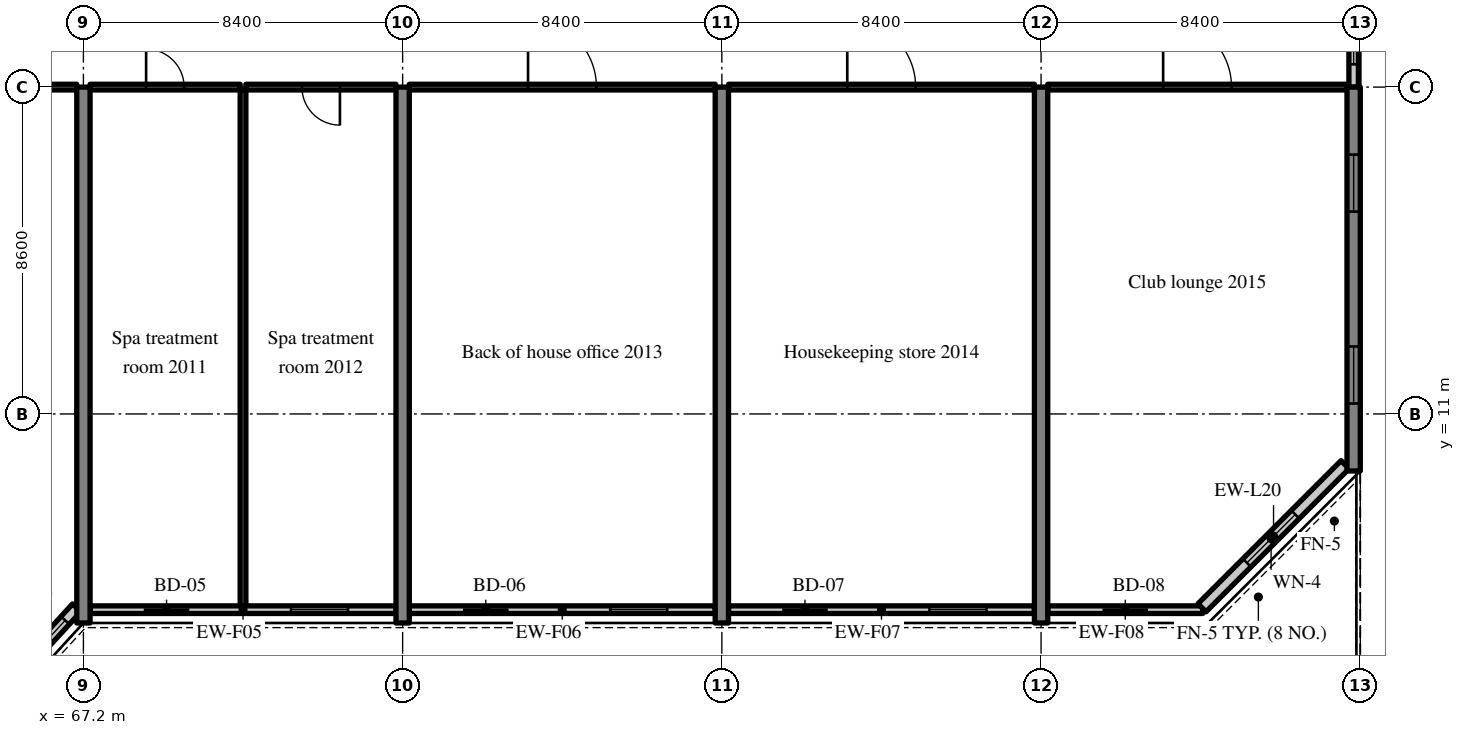
"""IFC4 building model, lengths in metres.
Left out: names, types, materials, properties, quantities, classifications, styles, units other than length and angle.
Written with IfcOpenShell. Run it as: python <this file> out.ifc"""

import sys

from ifc_helpers import new_model, si_unit, direction, frame, frame_2d, origin, place, context, subcontext, project, spatial, rectangle, extrude, source, transform, mapped, element, fill, save


model = new_model("IFC4")
c1 = context("Model", 3, precision=1e-05, world=origin(), true_north=direction((0.0, 1.0)))
c2 = subcontext(c1, "Body", "Model", "MODEL_VIEW")
j1 = project(units=[si_unit("LENGTHUNIT", "METRE"), si_unit("PLANEANGLEUNIT", "RADIAN")], contexts=[c1])
p1 = place(None, origin())
s1 = spatial("IfcSite", under=j1, at=p1, CompositionType="ELEMENT")
p2 = place(p1, origin())
s2 = spatial("IfcBuilding", under=s1, at=p2, CompositionType="ELEMENT")
p3 = place(p2, frame((0.0, 0.0, 86.4)))
s3 = spatial("IfcBuildingStorey", under=s2, at=p3, CompositionType="ELEMENT", Elevation=86.4)
m1 = source(origin(), c2, "Body", "SweptSolid", [
    extrude(rectangle(XDim=14.1, YDim=0.35, at=frame_2d((7.05, 0.0))), origin(), (0.0, 0.0, 1.0), 4.72),
])
for number, where, z_axis, x_axis in (
    (1, (67.2, 5.5, 0.0), (0.0, 0.0, 1.0), (0.0, 1.0, 0.0)),
    (2, (75.6, 5.5, 0.0), (0.0, 0.0, 1.0), (0.0, 1.0, 0.0)),
    (3, (84.0, 5.5, 0.0), (0.0, 0.0, 1.0), (0.0, 1.0, 0.0)),
    (4, (92.4, 5.5, 0.0), (0.0, 0.0, 1.0), (0.0, 1.0, 0.0)),
):
    element("IfcWall", number, at=place(p3, frame(where, z_axis=z_axis, x_axis=x_axis)), inside=s3, PredefinedType="SHEAR", context=c2, shape_type="MappedRepresentation", body=[
        mapped(m1, transform((0.0, 0.0, 0.0), scale=1.0)),
    ])
m2 = source(origin(), c2, "Body", "SweptSolid", [
    extrude(rectangle(XDim=10.1, YDim=0.35, at=frame_2d((5.05, 0.0))), origin(), (0.0, 0.0, 1.0), 4.72),
])
p4 = place(p3, frame((100.625, 9.5, 0.0), z_axis=(0.0, 0.0, 1.0), x_axis=(0.0, 1.0, 0.0)))
e5 = element("IfcWall", 5, at=p4, inside=s3, PredefinedType="SHEAR", context=c2, shape_type="MappedRepresentation", body=[
    mapped(m2, transform((0.0, 0.0, 0.0), scale=1.0)),
])
m3 = source(origin(), c2, "Body", "SweptSolid", [
    extrude(rectangle(XDim=1.5, YDim=1.5, at=frame_2d((0.75, 0.75))), frame((0.0, 0.185, 0.0), z_axis=(0.0, -1.0, 0.0), x_axis=(1.0, 0.0, 0.0)), (0.0, 0.0, 1.0), 0.37),
])
p5 = place(p4, frame((1.775, 0.0, 0.9)))
e6 = element("IfcOpeningElement", 6, at=p5, cuts=e5, PredefinedType="OPENING", context=c2, shape_type="MappedRepresentation", body=[
    mapped(m3, transform((0.0, 0.0, 0.0), scale=1.0)),
])
p6 = place(p4, frame((6.825, 0.0, 0.9)))
e7 = element("IfcOpeningElement", 7, at=p6, cuts=e5, PredefinedType="OPENING", context=c2, shape_type="MappedRepresentation", body=[
    mapped(m3, transform((0.0, 0.0, 0.0), scale=1.0)),
])
m4 = source(origin(), c2, "Body", "SweptSolid", [
    extrude(rectangle(XDim=2.398, YDim=0.3, at=frame_2d((1.199, 0.0))), origin(), (0.0, 0.0, 1.0), 4.72),
])
p7 = place(p3, frame((65.404, 4.131, 0.0), z_axis=(0.0, 0.0, 1.0), x_axis=(0.675374189419, 0.737475222815, 0.0)))
e8 = element("IfcWall", 8, at=p7, inside=s3, PredefinedType="SOLIDWALL", context=c2, shape_type="MappedRepresentation", body=[
    mapped(m4, transform((0.0, 0.0, 0.0), scale=1.0)),
])
m5 = source(origin(), c2, "Body", "SweptSolid", [
    extrude(rectangle(XDim=1.5, YDim=2.0, at=frame_2d((0.75, 1.0))), frame((0.0, 0.16, 0.0), z_axis=(0.0, -1.0, 0.0), x_axis=(1.0, 0.0, 0.0)), (0.0, 0.0, 1.0), 0.32),
])
p8 = place(p7, frame((0.449, 0.0, 0.9)))
e9 = element("IfcOpeningElement", 9, at=p8, cuts=e8, PredefinedType="OPENING", context=c2, shape_type="MappedRepresentation", body=[
    mapped(m5, transform((0.0, 0.0, 0.0), scale=1.0)),
])
m6 = source(origin(), c2, "Body", "SweptSolid", [
    extrude(rectangle(XDim=8.05, YDim=0.2, at=frame_2d((4.025, 0.0))), origin(), (0.0, 0.0, 1.0), 4.02),
])
p9 = place(p3, frame((67.375, 5.85, 0.0), z_axis=(0.0, 0.0, 1.0), x_axis=(1.0, 0.0, 0.0)))
e10 = element("IfcWall", 10, at=p9, inside=s3, PredefinedType="SOLIDWALL", context=c2, shape_type="MappedRepresentation", body=[
    mapped(m6, transform((0.0, 0.0, 0.0), scale=1.0)),
])
m7 = source(origin(), c2, "Body", "SweptSolid", [
    extrude(rectangle(XDim=1.5, YDim=1.5, at=frame_2d((0.75, 0.75))), frame((0.0, 0.11, 0.0), z_axis=(0.0, -1.0, 0.0), x_axis=(1.0, 0.0, 0.0)), (0.0, 0.0, 1.0), 0.22),
])
p10 = place(p9, frame((5.288, 0.0, 0.9)))
e11 = element("IfcOpeningElement", 11, at=p10, cuts=e10, PredefinedType="OPENING", context=c2, shape_type="MappedRepresentation", body=[
    mapped(m7, transform((0.0, 0.0, 0.0), scale=1.0)),
])
m8 = source(origin(), c2, "Body", "SweptSolid", [
    extrude(rectangle(XDim=1.2, YDim=2.4, at=frame_2d((0.6, 1.2))), frame((0.0, 0.11, 0.0), z_axis=(0.0, -1.0, 0.0), x_axis=(1.0, 0.0, 0.0)), (0.0, 0.0, 1.0), 0.22),
])
p11 = place(p9, frame((1.413, 0.0, 0.0)))
e12 = element("IfcOpeningElement", 12, at=p11, cuts=e10, PredefinedType="OPENING", context=c2, shape_type="MappedRepresentation", body=[
    mapped(m8, transform((0.0, 0.0, 0.0), scale=1.0)),
])
p12 = place(p3, frame((75.775, 5.85, 0.0), z_axis=(0.0, 0.0, 1.0), x_axis=(1.0, 0.0, 0.0)))
e13 = element("IfcWall", 13, at=p12, inside=s3, PredefinedType="SOLIDWALL", context=c2, shape_type="MappedRepresentation", body=[
    mapped(m6, transform((0.0, 0.0, 0.0), scale=1.0)),
])
p13 = place(p12, frame((5.288, 0.0, 0.9)))
e14 = element("IfcOpeningElement", 14, at=p13, cuts=e13, PredefinedType="OPENING", context=c2, shape_type="MappedRepresentation", body=[
    mapped(m7, transform((0.0, 0.0, 0.0), scale=1.0)),
])
p14 = place(p12, frame((1.413, 0.0, 0.0)))
e15 = element("IfcOpeningElement", 15, at=p14, cuts=e13, PredefinedType="OPENING", context=c2, shape_type="MappedRepresentation", body=[
    mapped(m8, transform((0.0, 0.0, 0.0), scale=1.0)),
])
p15 = place(p3, frame((84.175, 5.85, 0.0), z_axis=(0.0, 0.0, 1.0), x_axis=(1.0, 0.0, 0.0)))
e16 = element("IfcWall", 16, at=p15, inside=s3, PredefinedType="SOLIDWALL", context=c2, shape_type="MappedRepresentation", body=[
    mapped(m6, transform((0.0, 0.0, 0.0), scale=1.0)),
])
p16 = place(p15, frame((5.288, 0.0, 0.9)))
e17 = element("IfcOpeningElement", 17, at=p16, cuts=e16, PredefinedType="OPENING", context=c2, shape_type="MappedRepresentation", body=[
    mapped(m7, transform((0.0, 0.0, 0.0), scale=1.0)),
])
p17 = place(p15, frame((1.413, 0.0, 0.0)))
e18 = element("IfcOpeningElement", 18, at=p17, cuts=e16, PredefinedType="OPENING", context=c2, shape_type="MappedRepresentation", body=[
    mapped(m8, transform((0.0, 0.0, 0.0), scale=1.0)),
])
m9 = source(origin(), c2, "Body", "SweptSolid", [
    extrude(rectangle(XDim=4.08, YDim=0.2, at=frame_2d((2.04, 0.0))), origin(), (0.0, 0.0, 1.0), 4.02),
])
p18 = place(p3, frame((92.575, 5.85, 0.0), z_axis=(0.0, 0.0, 1.0), x_axis=(1.0, 0.0, 0.0)))
e19 = element("IfcWall", 19, at=p18, inside=s3, PredefinedType="SOLIDWALL", context=c2, shape_type="MappedRepresentation", body=[
    mapped(m9, transform((0.0, 0.0, 0.0), scale=1.0)),
])
p19 = place(p18, frame((1.44, 0.0, 0.0)))
e20 = element("IfcOpeningElement", 20, at=p19, cuts=e19, PredefinedType="OPENING", context=c2, shape_type="MappedRepresentation", body=[
    mapped(m8, transform((0.0, 0.0, 0.0), scale=1.0)),
])
m10 = source(origin(), c2, "Body", "SweptSolid", [
    extrude(rectangle(XDim=5.326, YDim=0.3, at=frame_2d((2.663, 0.0))), origin(), (0.0, 0.0, 1.0), 4.72),
])
p20 = place(p3, frame((96.634, 5.9, 0.0), z_axis=(0.0, 0.0, 1.0), x_axis=(0.707083859269, 0.707129702361, 0.0)))
e21 = element("IfcWall", 21, at=p20, inside=s3, PredefinedType="SOLIDWALL", context=c2, shape_type="MappedRepresentation", body=[
    mapped(m10, transform((0.0, 0.0, 0.0), scale=1.0)),
])
m11 = source(origin(), c2, "Body", "SweptSolid", [
    extrude(rectangle(XDim=1.8, YDim=1.5, at=frame_2d((0.9, 0.75))), frame((0.0, 0.16, 0.0), z_axis=(0.0, -1.0, 0.0), x_axis=(1.0, 0.0, 0.0)), (0.0, 0.0, 1.0), 0.32),
])
p21 = place(p20, frame((1.672, 0.0, 0.9)))
e22 = element("IfcOpeningElement", 22, at=p21, cuts=e21, PredefinedType="OPENING", context=c2, shape_type="MappedRepresentation", body=[
    mapped(m11, transform((0.0, 0.0, 0.0), scale=1.0)),
])
m12 = source(origin(), c2, "Body", "SweptSolid", [
    extrude(rectangle(XDim=2.4, YDim=0.25, at=frame_2d((1.2, 0.0))), origin(), (0.0, 0.0, 1.0), 3.82),
])
p22 = place(p3, frame((100.625, 19.6, 0.0), z_axis=(0.0, 0.0, 1.0), x_axis=(0.0, 1.0, 0.0)))
e23 = element("IfcWall", 23, at=p22, inside=s3, PredefinedType="SOLIDWALL", context=c2, shape_type="MappedRepresentation", body=[
    mapped(m12, transform((0.0, 0.0, 0.0), scale=1.0)),
])
m13 = source(origin(), c2, "Body", "SweptSolid", [
    extrude(rectangle(XDim=1.2, YDim=1.5, at=frame_2d((0.6, 0.75))), frame((0.0, 0.135, 0.0), z_axis=(0.0, -1.0, 0.0), x_axis=(1.0, 0.0, 0.0)), (0.0, 0.0, 1.0), 0.27),
])
p23 = place(p22, frame((0.6, 0.0, 0.9)))
e24 = element("IfcOpeningElement", 24, at=p23, cuts=e23, PredefinedType="OPENING", context=c2, shape_type="MappedRepresentation", body=[
    mapped(m13, transform((0.0, 0.0, 0.0), scale=1.0)),
])
m14 = source(origin(), c2, "Body", "SweptSolid", [
    extrude(rectangle(XDim=8.05, YDim=0.15, at=frame_2d((4.025, 0.0))), origin(), (0.0, 0.0, 1.0), 4.02),
])
p24 = place(p3, frame((58.975, 19.6, 0.0), z_axis=(0.0, 0.0, 1.0), x_axis=(1.0, 0.0, 0.0)))
e25 = element("IfcWall", 25, at=p24, inside=s3, PredefinedType="PARTITIONING", context=c2, shape_type="MappedRepresentation", body=[
    mapped(m14, transform((0.0, 0.0, 0.0), scale=1.0)),
])
m15 = source(origin(), c2, "Body", "SweptSolid", [
    extrude(rectangle(XDim=1.8, YDim=2.1, at=frame_2d((0.9, 1.05))), frame((0.0, 0.085, 0.0), z_axis=(0.0, -1.0, 0.0), x_axis=(1.0, 0.0, 0.0)), (0.0, 0.0, 1.0), 0.17),
])
p25 = place(p24, frame((3.125, 0.0, 0.0)))
e26 = element("IfcOpeningElement", 26, at=p25, cuts=e25, PredefinedType="OPENING", context=c2, shape_type="MappedRepresentation", body=[
    mapped(m15, transform((0.0, 0.0, 0.0), scale=1.0)),
])
m16 = source(origin(), c2, "Body", "SweptSolid", [
    extrude(rectangle(XDim=3.95, YDim=0.15, at=frame_2d((1.975, 0.0))), origin(), (0.0, 0.0, 1.0), 4.02),
])
p26 = place(p3, frame((67.375, 19.6, 0.0), z_axis=(0.0, 0.0, 1.0), x_axis=(1.0, 0.0, 0.0)))
e27 = element("IfcWall", 27, at=p26, inside=s3, PredefinedType="PARTITIONING", context=c2, shape_type="MappedRepresentation", body=[
    mapped(m16, transform((0.0, 0.0, 0.0), scale=1.0)),
])
m17 = source(origin(), c2, "Body", "SweptSolid", [
    extrude(rectangle(XDim=1.0, YDim=2.1, at=frame_2d((0.5, 1.05))), frame((0.0, 0.085, 0.0), z_axis=(0.0, -1.0, 0.0), x_axis=(1.0, 0.0, 0.0)), (0.0, 0.0, 1.0), 0.17),
])
p27 = place(p26, frame((1.475, 0.0, 0.0)))
e28 = element("IfcOpeningElement", 28, at=p27, cuts=e27, PredefinedType="OPENING", context=c2, shape_type="MappedRepresentation", body=[
    mapped(m17, transform((0.0, 0.0, 0.0), scale=1.0)),
])
p28 = place(p3, frame((71.475, 19.6, 0.0), z_axis=(0.0, 0.0, 1.0), x_axis=(1.0, 0.0, 0.0)))
e29 = element("IfcWall", 29, at=p28, inside=s3, PredefinedType="PARTITIONING", context=c2, shape_type="MappedRepresentation", body=[
    mapped(m16, transform((0.0, 0.0, 0.0), scale=1.0)),
])
p29 = place(p28, frame((1.475, 0.0, 0.0)))
e30 = element("IfcOpeningElement", 30, at=p29, cuts=e29, PredefinedType="OPENING", context=c2, shape_type="MappedRepresentation", body=[
    mapped(m17, transform((0.0, 0.0, 0.0), scale=1.0)),
])
m18 = source(origin(), c2, "Body", "SweptSolid", [
    extrude(rectangle(XDim=13.575, YDim=0.15, at=frame_2d((6.788, 0.0))), origin(), (0.0, 0.0, 1.0), 4.72),
])
p30 = place(p3, frame((71.4, 5.95, 0.0), z_axis=(0.0, 0.0, 1.0), x_axis=(0.0, 1.0, 0.0)))
e31 = element("IfcWall", 31, at=p30, inside=s3, PredefinedType="PARTITIONING", context=c2, shape_type="MappedRepresentation", body=[
    mapped(m18, transform((0.0, 0.0, 0.0), scale=1.0)),
])
m19 = source(origin(), c2, "Body", "SweptSolid", [
    extrude(rectangle(XDim=8.05, YDim=0.15, at=frame_2d((4.025, 0.0))), origin(), (0.0, 0.0, 1.0), 4.02),
])
p31 = place(p3, frame((75.775, 19.6, 0.0), z_axis=(0.0, 0.0, 1.0), x_axis=(1.0, 0.0, 0.0)))
e32 = element("IfcWall", 32, at=p31, inside=s3, PredefinedType="PARTITIONING", context=c2, shape_type="MappedRepresentation", body=[
    mapped(m19, transform((0.0, 0.0, 0.0), scale=1.0)),
])
p32 = place(p31, frame((3.125, 0.0, 0.0)))
e33 = element("IfcOpeningElement", 33, at=p32, cuts=e32, PredefinedType="OPENING", context=c2, shape_type="MappedRepresentation", body=[
    mapped(m15, transform((0.0, 0.0, 0.0), scale=1.0)),
])
p33 = place(p3, frame((84.175, 19.6, 0.0), z_axis=(0.0, 0.0, 1.0), x_axis=(1.0, 0.0, 0.0)))
e34 = element("IfcWall", 34, at=p33, inside=s3, PredefinedType="PARTITIONING", context=c2, shape_type="MappedRepresentation", body=[
    mapped(m19, transform((0.0, 0.0, 0.0), scale=1.0)),
])
p34 = place(p33, frame((3.125, 0.0, 0.0)))
e35 = element("IfcOpeningElement", 35, at=p34, cuts=e34, PredefinedType="OPENING", context=c2, shape_type="MappedRepresentation", body=[
    mapped(m15, transform((0.0, 0.0, 0.0), scale=1.0)),
])
m20 = source(origin(), c2, "Body", "SweptSolid", [
    extrude(rectangle(XDim=7.875, YDim=0.15, at=frame_2d((3.938, 0.0))), origin(), (0.0, 0.0, 1.0), 4.02),
])
p35 = place(p3, frame((92.575, 19.6, 0.0), z_axis=(0.0, 0.0, 1.0), x_axis=(1.0, 0.0, 0.0)))
e36 = element("IfcWall", 36, at=p35, inside=s3, PredefinedType="PARTITIONING", context=c2, shape_type="MappedRepresentation", body=[
    mapped(m20, transform((0.0, 0.0, 0.0), scale=1.0)),
])
p36 = place(p35, frame((3.037, 0.0, 0.0)))
e37 = element("IfcOpeningElement", 37, at=p36, cuts=e36, PredefinedType="OPENING", context=c2, shape_type="MappedRepresentation", body=[
    mapped(m15, transform((0.0, 0.0, 0.0), scale=1.0)),
])
m21 = source(origin(), c2, "Body", "SweptSolid", [
    extrude(rectangle(XDim=1.5, YDim=2.0, at=frame_2d((0.75, 1.0))), frame((0.0, 0.03, 0.0), z_axis=(0.0, -1.0, 0.0), x_axis=(1.0, 0.0, 0.0)), (0.0, 0.0, 1.0), 0.06),
])
p37 = place(p8, origin())
e38 = element("IfcWindow", 38, at=p37, inside=s3, PartitioningType="SINGLE_PANEL", PredefinedType="WINDOW", context=c2, shape_type="MappedRepresentation", body=[
    mapped(m21, transform((0.0, 0.0, 0.0), scale=1.0)),
])
fill(e9, e38)
m22 = source(origin(), c2, "Body", "SweptSolid", [
    extrude(rectangle(XDim=1.5, YDim=1.5, at=frame_2d((0.75, 0.75))), frame((0.0, 0.03, 0.0), z_axis=(0.0, -1.0, 0.0), x_axis=(1.0, 0.0, 0.0)), (0.0, 0.0, 1.0), 0.06),
])
p38 = place(p10, origin())
e39 = element("IfcWindow", 39, at=p38, inside=s3, PartitioningType="SINGLE_PANEL", PredefinedType="WINDOW", context=c2, shape_type="MappedRepresentation", body=[
    mapped(m22, transform((0.0, 0.0, 0.0), scale=1.0)),
])
fill(e11, e39)
p39 = place(p13, origin())
e40 = element("IfcWindow", 40, at=p39, inside=s3, PartitioningType="SINGLE_PANEL", PredefinedType="WINDOW", context=c2, shape_type="MappedRepresentation", body=[
    mapped(m22, transform((0.0, 0.0, 0.0), scale=1.0)),
])
fill(e14, e40)
p40 = place(p16, origin())
e41 = element("IfcWindow", 41, at=p40, inside=s3, PartitioningType="SINGLE_PANEL", PredefinedType="WINDOW", context=c2, shape_type="MappedRepresentation", body=[
    mapped(m22, transform((0.0, 0.0, 0.0), scale=1.0)),
])
fill(e17, e41)
m23 = source(origin(), c2, "Body", "SweptSolid", [
    extrude(rectangle(XDim=1.8, YDim=1.5, at=frame_2d((0.9, 0.75))), frame((0.0, 0.03, 0.0), z_axis=(0.0, -1.0, 0.0), x_axis=(1.0, 0.0, 0.0)), (0.0, 0.0, 1.0), 0.06),
])
p41 = place(p21, origin())
e42 = element("IfcWindow", 42, at=p41, inside=s3, PartitioningType="SINGLE_PANEL", PredefinedType="WINDOW", context=c2, shape_type="MappedRepresentation", body=[
    mapped(m23, transform((0.0, 0.0, 0.0), scale=1.0)),
])
fill(e22, e42)
p42 = place(p5, origin())
e43 = element("IfcWindow", 43, at=p42, inside=s3, PartitioningType="SINGLE_PANEL", PredefinedType="WINDOW", context=c2, shape_type="MappedRepresentation", body=[
    mapped(m22, transform((0.0, 0.0, 0.0), scale=1.0)),
])
fill(e6, e43)
p43 = place(p6, origin())
e44 = element("IfcWindow", 44, at=p43, inside=s3, PartitioningType="SINGLE_PANEL", PredefinedType="WINDOW", context=c2, shape_type="MappedRepresentation", body=[
    mapped(m22, transform((0.0, 0.0, 0.0), scale=1.0)),
])
fill(e7, e44)
m24 = source(origin(), c2, "Body", "SweptSolid", [
    extrude(rectangle(XDim=1.2, YDim=1.5, at=frame_2d((0.6, 0.75))), frame((0.0, 0.03, 0.0), z_axis=(0.0, -1.0, 0.0), x_axis=(1.0, 0.0, 0.0)), (0.0, 0.0, 1.0), 0.06),
])
p44 = place(p23, origin())
e45 = element("IfcWindow", 45, at=p44, inside=s3, PartitioningType="SINGLE_PANEL", PredefinedType="WINDOW", context=c2, shape_type="MappedRepresentation", body=[
    mapped(m24, transform((0.0, 0.0, 0.0), scale=1.0)),
])
fill(e24, e45)
m25 = source(origin(), c2, "Body", "SweptSolid", [
    extrude(rectangle(XDim=1.2, YDim=2.4, at=frame_2d((0.6, 1.2))), frame((0.0, 0.025, 0.0), z_axis=(0.0, -1.0, 0.0), x_axis=(1.0, 0.0, 0.0)), (0.0, 0.0, 1.0), 0.05),
])
p45 = place(p11, origin())
e46 = element("IfcDoor", 46, at=p45, inside=s3, OperationType="SLIDING_TO_LEFT", PredefinedType="DOOR", context=c2, shape_type="MappedRepresentation", body=[
    mapped(m25, transform((0.0, 0.0, 0.0), scale=1.0)),
])
fill(e12, e46)
p46 = place(p14, origin())
e47 = element("IfcDoor", 47, at=p46, inside=s3, OperationType="SLIDING_TO_RIGHT", PredefinedType="DOOR", context=c2, shape_type="MappedRepresentation", body=[
    mapped(m25, transform((0.0, 0.0, 0.0), scale=1.0)),
])
fill(e15, e47)
p47 = place(p17, origin())
e48 = element("IfcDoor", 48, at=p47, inside=s3, OperationType="SLIDING_TO_LEFT", PredefinedType="DOOR", context=c2, shape_type="MappedRepresentation", body=[
    mapped(m25, transform((0.0, 0.0, 0.0), scale=1.0)),
])
fill(e18, e48)
p48 = place(p19, origin())
e49 = element("IfcDoor", 49, at=p48, inside=s3, OperationType="SLIDING_TO_RIGHT", PredefinedType="DOOR", context=c2, shape_type="MappedRepresentation", body=[
    mapped(m25, transform((0.0, 0.0, 0.0), scale=1.0)),
])
fill(e20, e49)
m26 = source(origin(), c2, "Body", "SweptSolid", [
    extrude(rectangle(XDim=1.0, YDim=2.1, at=frame_2d((0.5, 1.05))), frame((0.0, 0.025, 0.0), z_axis=(0.0, -1.0, 0.0), x_axis=(1.0, 0.0, 0.0)), (0.0, 0.0, 1.0), 0.05),
])
p49 = place(p27, origin())
e50 = element("IfcDoor", 50, at=p49, inside=s3, OperationType="SINGLE_SWING_LEFT", PredefinedType="DOOR", context=c2, shape_type="MappedRepresentation", body=[
    mapped(m26, transform((0.0, 0.0, 0.0), scale=1.0)),
])
fill(e28, e50)
p50 = place(p29, origin())
e51 = element("IfcDoor", 51, at=p50, inside=s3, OperationType="SINGLE_SWING_RIGHT", PredefinedType="DOOR", context=c2, shape_type="MappedRepresentation", body=[
    mapped(m26, transform((0.0, 0.0, 0.0), scale=1.0)),
])
fill(e30, e51)
m27 = source(origin(), c2, "Body", "SweptSolid", [
    extrude(rectangle(XDim=1.8, YDim=2.1, at=frame_2d((0.9, 1.05))), frame((0.0, 0.025, 0.0), z_axis=(0.0, -1.0, 0.0), x_axis=(1.0, 0.0, 0.0)), (0.0, 0.0, 1.0), 0.05),
])
p51 = place(p32, origin())
e52 = element("IfcDoor", 52, at=p51, inside=s3, OperationType="DOUBLE_DOOR_SINGLE_SWING", PredefinedType="DOOR", context=c2, shape_type="MappedRepresentation", body=[
    mapped(m27, transform((0.0, 0.0, 0.0), scale=1.0)),
])
fill(e33, e52)
p52 = place(p34, origin())
e53 = element("IfcDoor", 53, at=p52, inside=s3, OperationType="DOUBLE_DOOR_SINGLE_SWING", PredefinedType="DOOR", context=c2, shape_type="MappedRepresentation", body=[
    mapped(m27, transform((0.0, 0.0, 0.0), scale=1.0)),
])
fill(e35, e53)
p53 = place(p36, origin())
e54 = element("IfcDoor", 54, at=p53, inside=s3, OperationType="DOUBLE_DOOR_SINGLE_SWING", PredefinedType="DOOR", context=c2, shape_type="MappedRepresentation", body=[
    mapped(m27, transform((0.0, 0.0, 0.0), scale=1.0)),
])
fill(e37, e54)
save(model, sys.argv[1])
